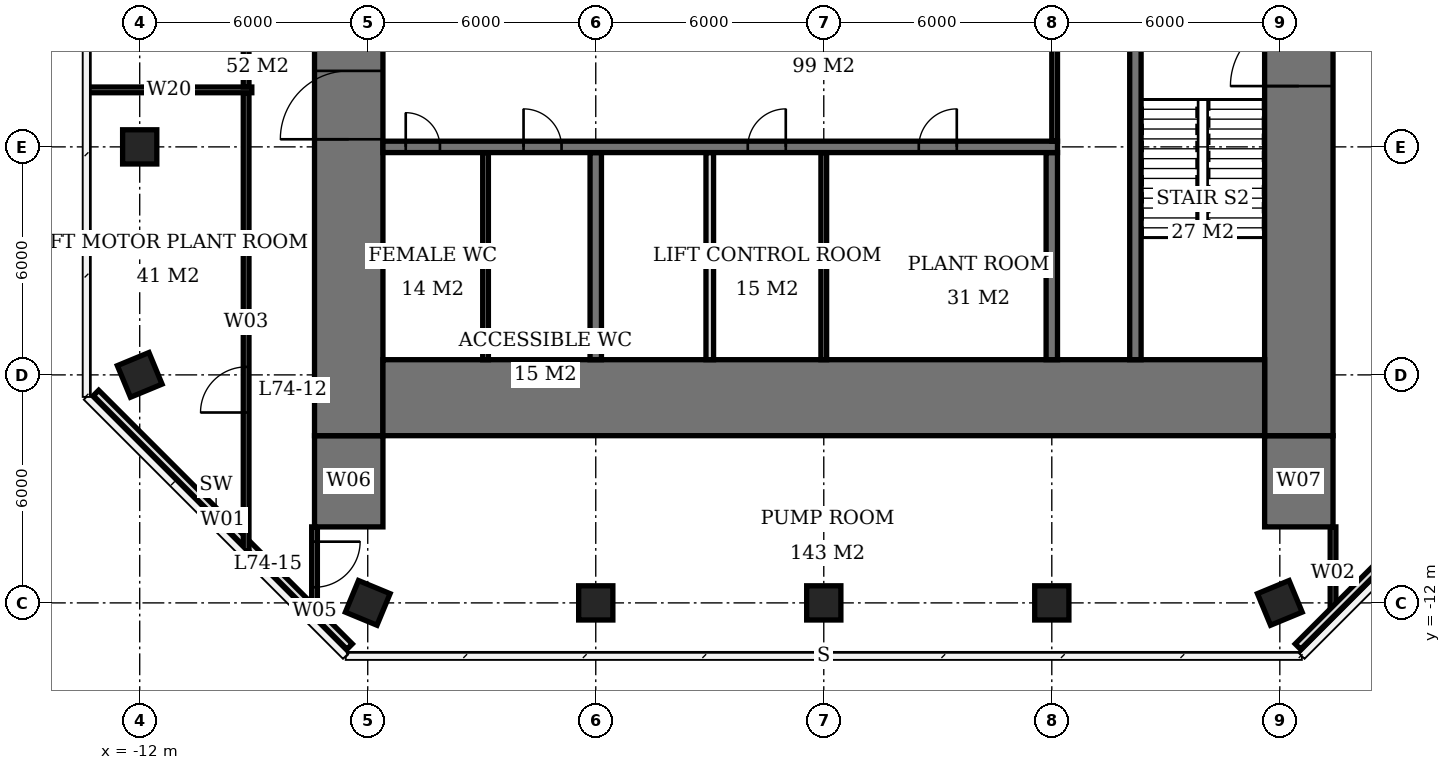
"""IFC4 building model, lengths in metres.
Left out: names, types, materials, properties, quantities, classifications, styles, units other than length and angle.
Written with IfcOpenShell. Run it as: python <this file> out.ifc"""

import sys

from ifc_helpers import new_model, si_unit, direction, frame, frame_2d, origin, origin_2d, place, context, subcontext, project, spatial, rectangle, extrude, element, fill, save


model = new_model("IFC4")
c1 = context("Model", 3, precision=1e-05, world=origin(), true_north=direction((0.0, 1.0)))
c2 = subcontext(c1, "Body", "Model", "MODEL_VIEW")
j1 = project(units=[si_unit("LENGTHUNIT", "METRE"), si_unit("PLANEANGLEUNIT", "RADIAN")], contexts=[c1])
p1 = place(None, origin())
s1 = spatial("IfcSite", under=j1, at=p1, CompositionType="ELEMENT")
p2 = place(p1, origin())
s2 = spatial("IfcBuilding", under=s1, at=p2, CompositionType="ELEMENT")
p3 = place(p2, frame((0.0, 0.0, 300.7)))
s3 = spatial("IfcBuildingStorey", under=s2, at=p3, CompositionType="ELEMENT", Elevation=300.7)
for number, where, z_axis, x_axis in (
    (1, (-12.0, -6.0, 0.0), (0.0, 0.0, 1.0), (-0.383, 0.924, 0.0)),
    (2, (-12.0, 0.0, 0.0), (0.0, 0.0, 1.0), (0.0, 1.0, 0.0)),
    (3, (-6.0, -12.0, 0.0), (0.0, 0.0, 1.0), (-0.924, 0.383, 0.0)),
    (4, (0.0, -12.0, 0.0), (0.0, 0.0, 1.0), (1.0, 0.0, 0.0)),
    (5, (6.0, -12.0, 0.0), (0.0, 0.0, 1.0), (1.0, 0.0, 0.0)),
    (6, (12.0, -12.0, 0.0), (0.0, 0.0, 1.0), (1.0, 0.0, 0.0)),
    (7, (18.0, -12.0, 0.0), (0.0, 0.0, 1.0), (-0.924, -0.383, 0.0)),
):
    element("IfcColumn", number, at=place(p3, frame(where, z_axis=z_axis, x_axis=x_axis)), inside=s3, PredefinedType="COLUMN", context=c2, shape_type="SweptSolid", body=[
        extrude(rectangle(XDim=0.9, YDim=0.9, at=origin_2d()), origin(), (0.0, 0.0, 1.0), 5.0),
    ])
p4 = place(p3, frame((-5.6, -6.6, 0.0), z_axis=(0.0, 0.0, 1.0), x_axis=(1.0, 0.0, 0.0)))
e8 = element("IfcWall", 8, at=p4, inside=s3, PredefinedType="SHEAR", context=c2, shape_type="SweptSolid", body=[
    extrude(rectangle(XDim=23.2, YDim=2.0, at=frame_2d((11.6, 0.0))), origin(), (0.0, 0.0, 1.0), 5.0),
])
p5 = place(p3, frame((-6.5, -7.6, 0.0), z_axis=(0.0, 0.0, 1.0), x_axis=(0.0, 1.0, 0.0)))
e9 = element("IfcWall", 9, at=p5, inside=s3, PredefinedType="SHEAR", context=c2, shape_type="SweptSolid", body=[
    extrude(rectangle(XDim=21.2, YDim=1.8, at=frame_2d((10.6, 0.0))), origin(), (0.0, 0.0, 1.0), 5.0),
])
p6 = place(p5, frame((7.8, 0.0, 0.0)))
e10 = element("IfcOpeningElement", 10, at=p6, cuts=e9, PredefinedType="OPENING", context=c2, shape_type="SweptSolid", body=[
    extrude(rectangle(XDim=1.8, YDim=2.4, at=frame_2d((0.9, 1.2))), frame((0.0, 0.91, 0.0), z_axis=(0.0, -1.0, 0.0), x_axis=(1.0, 0.0, 0.0)), (0.0, 0.0, 1.0), 1.82),
])
p7 = place(p3, frame((18.5, -7.6, 0.0), z_axis=(0.0, 0.0, 1.0), x_axis=(0.0, 1.0, 0.0)))
e11 = element("IfcWall", 11, at=p7, inside=s3, PredefinedType="SHEAR", context=c2, shape_type="SweptSolid", body=[
    extrude(rectangle(XDim=21.2, YDim=1.8, at=frame_2d((10.6, 0.0))), origin(), (0.0, 0.0, 1.0), 5.0),
])
p8 = place(p7, frame((9.2, 0.0, 0.0)))
e12 = element("IfcOpeningElement", 12, at=p8, cuts=e11, PredefinedType="OPENING", context=c2, shape_type="SweptSolid", body=[
    extrude(rectangle(XDim=1.8, YDim=2.4, at=frame_2d((0.9, 1.2))), frame((0.0, 0.91, 0.0), z_axis=(0.0, -1.0, 0.0), x_axis=(1.0, 0.0, 0.0)), (0.0, 0.0, 1.0), 1.82),
])
for number, where, z_axis, x_axis in (
    (13, (-6.5, -10.0, 0.0), (0.0, 0.0, 1.0), (0.0, 1.0, 0.0)),
    (14, (18.5, -10.0, 0.0), (0.0, 0.0, 1.0), (0.0, 1.0, 0.0)),
):
    element("IfcWall", number, at=place(p3, frame(where, z_axis=z_axis, x_axis=x_axis)), inside=s3, PredefinedType="SHEAR", context=c2, shape_type="SweptSolid", body=[
        extrude(rectangle(XDim=2.4, YDim=1.8, at=frame_2d((1.2, 0.0))), origin(), (0.0, 0.0, 1.0), 5.0),
    ])
p9 = place(p3, frame((-5.6, 0.0, 0.0), z_axis=(0.0, 0.0, 1.0), x_axis=(1.0, 0.0, 0.0)))
e15 = element("IfcWall", 15, at=p9, inside=s3, PredefinedType="SHEAR", context=c2, shape_type="SweptSolid", body=[
    extrude(rectangle(XDim=17.75, YDim=0.3, at=frame_2d((8.875, 0.0))), origin(), (0.0, 0.0, 1.0), 5.0),
])
p10 = place(p9, frame((0.6, 0.0, 0.0)))
e16 = element("IfcOpeningElement", 16, at=p10, cuts=e15, PredefinedType="OPENING", context=c2, shape_type="SweptSolid", body=[
    extrude(rectangle(XDim=0.9, YDim=2.1, at=frame_2d((0.45, 1.05))), frame((0.0, 0.16, 0.0), z_axis=(0.0, -1.0, 0.0), x_axis=(1.0, 0.0, 0.0)), (0.0, 0.0, 1.0), 0.32),
])
p11 = place(p9, frame((3.7, 0.0, 0.0)))
e17 = element("IfcOpeningElement", 17, at=p11, cuts=e15, PredefinedType="OPENING", context=c2, shape_type="SweptSolid", body=[
    extrude(rectangle(XDim=1.0, YDim=2.1, at=frame_2d((0.5, 1.05))), frame((0.0, 0.16, 0.0), z_axis=(0.0, -1.0, 0.0), x_axis=(1.0, 0.0, 0.0)), (0.0, 0.0, 1.0), 0.32),
])
p12 = place(p9, frame((9.6, 0.0, 0.0)))
e18 = element("IfcOpeningElement", 18, at=p12, cuts=e15, PredefinedType="OPENING", context=c2, shape_type="SweptSolid", body=[
    extrude(rectangle(XDim=1.0, YDim=2.1, at=frame_2d((0.5, 1.05))), frame((0.0, 0.16, 0.0), z_axis=(0.0, -1.0, 0.0), x_axis=(1.0, 0.0, 0.0)), (0.0, 0.0, 1.0), 0.32),
])
p13 = place(p9, frame((14.1, 0.0, 0.0)))
e19 = element("IfcOpeningElement", 19, at=p13, cuts=e15, PredefinedType="OPENING", context=c2, shape_type="SweptSolid", body=[
    extrude(rectangle(XDim=1.0, YDim=2.1, at=frame_2d((0.5, 1.05))), frame((0.0, 0.16, 0.0), z_axis=(0.0, -1.0, 0.0), x_axis=(1.0, 0.0, 0.0)), (0.0, 0.0, 1.0), 0.32),
])
for number, where, z_axis, x_axis in (
    (20, (0.0, -5.6, 0.0), (0.0, 0.0, 1.0), (0.0, 1.0, 0.0)),
    (21, (12.0, -5.6, 0.0), (0.0, 0.0, 1.0), (0.0, 1.0, 0.0)),
):
    element("IfcWall", number, at=place(p3, frame(where, z_axis=z_axis, x_axis=x_axis)), inside=s3, PredefinedType="SHEAR", context=c2, shape_type="SweptSolid", body=[
        extrude(rectangle(XDim=5.45, YDim=0.3, at=frame_2d((2.725, 0.0))), origin(), (0.0, 0.0, 1.0), 5.0),
    ])
p14 = place(p3, frame((14.2, -5.6, 0.0), z_axis=(0.0, 0.0, 1.0), x_axis=(0.0, 1.0, 0.0)))
e22 = element("IfcWall", 22, at=p14, inside=s3, PredefinedType="SHEAR", context=c2, shape_type="SweptSolid", body=[
    extrude(rectangle(XDim=8.45, YDim=0.3, at=frame_2d((4.225, 0.0))), origin(), (0.0, 0.0, 1.0), 5.0),
])
p15 = place(p3, frame((3.0, -5.6, 0.0), z_axis=(0.0, 0.0, 1.0), x_axis=(0.0, 1.0, 0.0)))
e23 = element("IfcWall", 23, at=p15, inside=s3, PredefinedType="SOLIDWALL", context=c2, shape_type="SweptSolid", body=[
    extrude(rectangle(XDim=5.45, YDim=0.2, at=frame_2d((2.725, 0.0))), origin(), (0.0, 0.0, 1.0), 5.0),
])
for number, where, z_axis, x_axis in (
    (24, (25.15, -6.476, 6.1), (0.0, 0.0, 1.0), (-0.707, -0.707, 0.0)),
    (25, (-6.476, -13.15, 6.1), (0.0, 0.0, 1.0), (-0.707, 0.707, 0.0)),
):
    element("IfcWall", number, at=place(p3, frame(where, z_axis=z_axis, x_axis=x_axis)), inside=s3, PredefinedType="USERDEFINED", context=c2, shape_type="SweptSolid", body=[
        extrude(rectangle(XDim=9.438, YDim=0.2, at=frame_2d((4.719, 0.0))), origin(), (0.0, 0.0, 1.0), 1.9),
    ])
p16 = place(p3, frame((-2.9, -5.6, 0.0), z_axis=(0.0, 0.0, 1.0), x_axis=(0.0, 1.0, 0.0)))
e26 = element("IfcWall", 26, at=p16, inside=s3, PredefinedType="PLUMBINGWALL", context=c2, shape_type="SweptSolid", body=[
    extrude(rectangle(XDim=5.45, YDim=0.15, at=frame_2d((2.725, 0.0))), origin(), (0.0, 0.0, 1.0), 4.75),
])
p17 = place(p3, frame((6.0, -5.6, 0.0), z_axis=(0.0, 0.0, 1.0), x_axis=(0.0, 1.0, 0.0)))
e27 = element("IfcWall", 27, at=p17, inside=s3, PredefinedType="PARTITIONING", context=c2, shape_type="SweptSolid", body=[
    extrude(rectangle(XDim=5.45, YDim=0.15, at=frame_2d((2.725, 0.0))), origin(), (0.0, 0.0, 1.0), 4.75),
])
p18 = place(p3, frame((-13.4, 1.5, 0.0), z_axis=(0.0, 0.0, 1.0), x_axis=(1.0, 0.0, 0.0)))
e28 = element("IfcWall", 28, at=p18, inside=s3, PredefinedType="PARTITIONING", context=c2, shape_type="SweptSolid", body=[
    extrude(rectangle(XDim=4.35, YDim=0.15, at=frame_2d((2.175, 0.0))), origin(), (0.0, 0.0, 1.0), 4.75),
])
p19 = place(p3, frame((-9.2, -10.639, 0.0), z_axis=(0.0, 0.0, 1.0), x_axis=(0.0, 1.0, 0.0)))
e29 = element("IfcWall", 29, at=p19, inside=s3, PredefinedType="PARTITIONING", context=c2, shape_type="SweptSolid", body=[
    extrude(rectangle(XDim=12.064, YDim=0.15, at=frame_2d((6.032, 0.0))), origin(), (0.0, 0.0, 1.0), 4.75),
])
p20 = place(p19, frame((3.649, 0.0, 0.0)))
e30 = element("IfcOpeningElement", 30, at=p20, cuts=e29, PredefinedType="OPENING", context=c2, shape_type="SweptSolid", body=[
    extrude(rectangle(XDim=1.2, YDim=2.4, at=frame_2d((0.6, 1.2))), frame((0.0, 0.085, 0.0), z_axis=(0.0, -1.0, 0.0), x_axis=(1.0, 0.0, 0.0)), (0.0, 0.0, 1.0), 0.17),
])
p21 = place(p3, frame((-9.2, 1.575, 0.0), z_axis=(0.0, 0.0, 1.0), x_axis=(0.0, 1.0, 0.0)))
e31 = element("IfcWall", 31, at=p21, inside=s3, PredefinedType="PARTITIONING", context=c2, shape_type="SweptSolid", body=[
    extrude(rectangle(XDim=15.064, YDim=0.15, at=frame_2d((7.532, 0.0))), origin(), (0.0, 0.0, 1.0), 4.75),
])
p22 = place(p21, frame((4.624, 0.0, 0.0)))
e32 = element("IfcOpeningElement", 32, at=p22, cuts=e31, PredefinedType="OPENING", context=c2, shape_type="SweptSolid", body=[
    extrude(rectangle(XDim=1.2, YDim=2.4, at=frame_2d((0.6, 1.2))), frame((0.0, 0.085, 0.0), z_axis=(0.0, -1.0, 0.0), x_axis=(1.0, 0.0, 0.0)), (0.0, 0.0, 1.0), 0.17),
])
p23 = place(p3, frame((-7.4, -10.0, 0.0), z_axis=(0.0, 0.0, 1.0), x_axis=(0.0, -1.0, 0.0)))
e33 = element("IfcWall", 33, at=p23, inside=s3, PredefinedType="PARTITIONING", context=c2, shape_type="SweptSolid", body=[
    extrude(rectangle(XDim=2.439, YDim=0.15, at=frame_2d((1.219, 0.0))), origin(), (0.0, 0.0, 1.0), 4.75),
])
p24 = place(p23, frame((0.389, 0.0, 0.0)))
e34 = element("IfcOpeningElement", 34, at=p24, cuts=e33, PredefinedType="OPENING", context=c2, shape_type="SweptSolid", body=[
    extrude(rectangle(XDim=1.2, YDim=2.4, at=frame_2d((0.6, 1.2))), frame((0.0, 0.085, 0.0), z_axis=(0.0, -1.0, 0.0), x_axis=(1.0, 0.0, 0.0)), (0.0, 0.0, 1.0), 0.17),
])
p25 = place(p3, frame((19.4, -12.439, 0.0), z_axis=(0.0, 0.0, 1.0), x_axis=(0.0, 1.0, 0.0)))
e35 = element("IfcWall", 35, at=p25, inside=s3, PredefinedType="PARTITIONING", context=c2, shape_type="SweptSolid", body=[
    extrude(rectangle(XDim=2.439, YDim=0.15, at=frame_2d((1.219, 0.0))), origin(), (0.0, 0.0, 1.0), 4.75),
])
p26 = place(p3, frame((12.075, 0.15, 0.0), z_axis=(0.0, 0.0, 1.0), x_axis=(0.0, 1.0, 0.0)))
e36 = element("IfcWall", 36, at=p26, inside=s3, PredefinedType="PARTITIONING", context=c2, shape_type="SweptSolid", body=[
    extrude(rectangle(XDim=3.0, YDim=0.15, at=frame_2d((1.5, 0.0))), origin(), (0.0, 0.0, 1.0), 4.75),
])
p27 = place(p6, origin())
e37 = element("IfcDoor", 37, at=p27, inside=s3, OperationType="DOUBLE_DOOR_SINGLE_SWING", PredefinedType="DOOR", context=c2, shape_type="SweptSolid", body=[
    extrude(rectangle(XDim=1.8, YDim=2.4, at=frame_2d((0.9, 1.2))), frame((0.0, 0.025, 0.0), z_axis=(0.0, -1.0, 0.0), x_axis=(1.0, 0.0, 0.0)), (0.0, 0.0, 1.0), 0.05),
])
fill(e10, e37)
p28 = place(p8, origin())
e38 = element("IfcDoor", 38, at=p28, inside=s3, OperationType="DOUBLE_DOOR_SINGLE_SWING", PredefinedType="DOOR", context=c2, shape_type="SweptSolid", body=[
    extrude(rectangle(XDim=1.8, YDim=2.4, at=frame_2d((0.9, 1.2))), frame((0.0, 0.025, 0.0), z_axis=(0.0, -1.0, 0.0), x_axis=(1.0, 0.0, 0.0)), (0.0, 0.0, 1.0), 0.05),
])
fill(e12, e38)
p29 = place(p10, origin())
e39 = element("IfcDoor", 39, at=p29, inside=s3, OperationType="SINGLE_SWING_LEFT", PredefinedType="DOOR", context=c2, shape_type="SweptSolid", body=[
    extrude(rectangle(XDim=0.9, YDim=2.1, at=frame_2d((0.45, 1.05))), frame((0.0, 0.025, 0.0), z_axis=(0.0, -1.0, 0.0), x_axis=(1.0, 0.0, 0.0)), (0.0, 0.0, 1.0), 0.05),
])
fill(e16, e39)
p30 = place(p11, origin())
e40 = element("IfcDoor", 40, at=p30, inside=s3, OperationType="SINGLE_SWING_LEFT", PredefinedType="DOOR", context=c2, shape_type="SweptSolid", body=[
    extrude(rectangle(XDim=1.0, YDim=2.1, at=frame_2d((0.5, 1.05))), frame((0.0, 0.025, 0.0), z_axis=(0.0, -1.0, 0.0), x_axis=(1.0, 0.0, 0.0)), (0.0, 0.0, 1.0), 0.05),
])
fill(e17, e40)
p31 = place(p12, origin())
e41 = element("IfcDoor", 41, at=p31, inside=s3, OperationType="SINGLE_SWING_RIGHT", PredefinedType="DOOR", context=c2, shape_type="SweptSolid", body=[
    extrude(rectangle(XDim=1.0, YDim=2.1, at=frame_2d((0.5, 1.05))), frame((0.0, 0.025, 0.0), z_axis=(0.0, -1.0, 0.0), x_axis=(1.0, 0.0, 0.0)), (0.0, 0.0, 1.0), 0.05),
])
fill(e18, e41)
p32 = place(p13, origin())
e42 = element("IfcDoor", 42, at=p32, inside=s3, OperationType="SINGLE_SWING_RIGHT", PredefinedType="DOOR", context=c2, shape_type="SweptSolid", body=[
    extrude(rectangle(XDim=1.0, YDim=2.1, at=frame_2d((0.5, 1.05))), frame((0.0, 0.025, 0.0), z_axis=(0.0, -1.0, 0.0), x_axis=(1.0, 0.0, 0.0)), (0.0, 0.0, 1.0), 0.05),
])
fill(e19, e42)
p33 = place(p20, origin())
e43 = element("IfcDoor", 43, at=p33, inside=s3, OperationType="SINGLE_SWING_LEFT", PredefinedType="DOOR", context=c2, shape_type="SweptSolid", body=[
    extrude(rectangle(XDim=1.2, YDim=2.4, at=frame_2d((0.6, 1.2))), frame((0.0, 0.025, 0.0), z_axis=(0.0, -1.0, 0.0), x_axis=(1.0, 0.0, 0.0)), (0.0, 0.0, 1.0), 0.05),
])
fill(e30, e43)
p34 = place(p24, origin())
e44 = element("IfcDoor", 44, at=p34, inside=s3, OperationType="SINGLE_SWING_LEFT", PredefinedType="DOOR", context=c2, shape_type="SweptSolid", body=[
    extrude(rectangle(XDim=1.2, YDim=2.4, at=frame_2d((0.6, 1.2))), frame((0.0, 0.025, 0.0), z_axis=(0.0, -1.0, 0.0), x_axis=(1.0, 0.0, 0.0)), (0.0, 0.0, 1.0), 0.05),
])
fill(e34, e44)
save(model, sys.argv[1])
